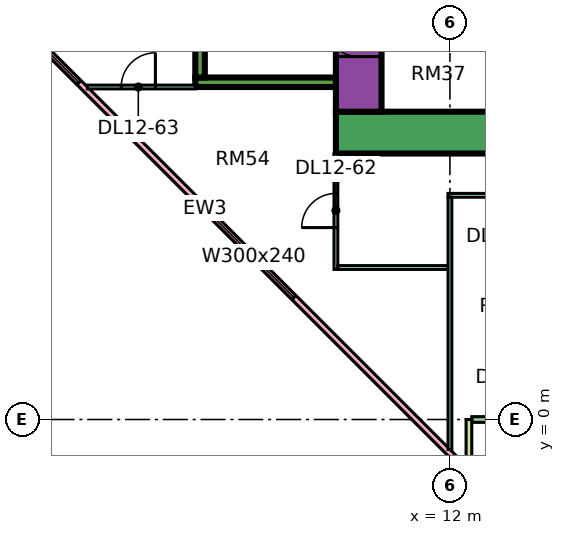
"""IFC4 building model, lengths in metres.
Left out: names, types, materials, properties, quantities, classifications, styles, units other than length and angle.
Written with IfcOpenShell. Run it as: python <this file> out.ifc"""

import sys

from ifc_helpers import new_model, si_unit, direction, frame, frame_2d, origin, place, context, subcontext, project, spatial, rectangle, extrude, element, fill, save


model = new_model("IFC4")
c1 = context("Model", 3, precision=1e-05, world=origin(), true_north=direction((0.0, 1.0)))
c2 = subcontext(c1, "Body", "Model", "MODEL_VIEW")
j1 = project(units=[si_unit("LENGTHUNIT", "METRE"), si_unit("PLANEANGLEUNIT", "RADIAN")], contexts=[c1])
p1 = place(None, origin())
s1 = spatial("IfcSite", under=j1, at=p1, CompositionType="ELEMENT")
p2 = place(p1, origin())
s2 = spatial("IfcBuilding", under=s1, at=p2, CompositionType="ELEMENT")
p3 = place(p2, frame((0.0, 0.0, 60.15)))
s3 = spatial("IfcBuildingStorey", under=s2, at=p3, CompositionType="ELEMENT", Elevation=60.15)
p4 = place(p3, frame((9.0, 7.55, 0.0), z_axis=(0.0, 0.0, 1.0), x_axis=(1.0, 0.0, 0.0)))
e1 = element("IfcWall", 1, at=p4, inside=s3, PredefinedType="SHEAR", context=c2, shape_type="SweptSolid", body=[
    extrude(rectangle(XDim=25.0, YDim=1.1, at=frame_2d((12.5, 0.0))), origin(), (0.0, 0.0, 1.0), 3.75),
])
p5 = place(p3, frame((9.6, 8.1, 0.0), z_axis=(0.0, 0.0, 1.0), x_axis=(0.0, 1.0, 0.0)))
e2 = element("IfcWall", 2, at=p5, inside=s3, PredefinedType="SHEAR", context=c2, shape_type="SweptSolid", body=[
    extrude(rectangle(XDim=10.8, YDim=1.2, at=frame_2d((5.4, 0.0))), origin(), (0.0, 0.0, 1.0), 3.75),
])
p6 = place(p5, frame((3.775, 0.0, 0.0)))
e3 = element("IfcOpeningElement", 3, at=p6, cuts=e2, PredefinedType="OPENING", context=c2, shape_type="SweptSolid", body=[
    extrude(rectangle(XDim=1.1, YDim=2.2, at=frame_2d((0.55, 1.1))), frame((0.0, 0.61, 0.0), z_axis=(0.0, -1.0, 0.0), x_axis=(1.0, 0.0, 0.0)), (0.0, 0.0, 1.0), 1.22),
])
p7 = place(p5, frame((6.275, 0.0, 0.0)))
e4 = element("IfcOpeningElement", 4, at=p7, cuts=e2, PredefinedType="OPENING", context=c2, shape_type="SweptSolid", body=[
    extrude(rectangle(XDim=1.1, YDim=2.2, at=frame_2d((0.55, 1.1))), frame((0.0, 0.61, 0.0), z_axis=(0.0, -1.0, 0.0), x_axis=(1.0, 0.0, 0.0)), (0.0, 0.0, 1.0), 1.22),
])
p8 = place(p5, frame((8.95, 0.0, 0.0)))
e5 = element("IfcOpeningElement", 5, at=p8, cuts=e2, PredefinedType="OPENING", context=c2, shape_type="SweptSolid", body=[
    extrude(rectangle(XDim=1.1, YDim=2.2, at=frame_2d((0.55, 1.1))), frame((0.0, 0.61, 0.0), z_axis=(0.0, -1.0, 0.0), x_axis=(1.0, 0.0, 0.0)), (0.0, 0.0, 1.0), 1.22),
])
p9 = place(p5, frame((1.45, 0.0, 0.0)))
e6 = element("IfcOpeningElement", 6, at=p9, cuts=e2, PredefinedType="OPENING", context=c2, shape_type="SweptSolid", body=[
    extrude(rectangle(XDim=0.9, YDim=2.1, at=frame_2d((0.45, 1.05))), frame((0.0, 0.61, 0.0), z_axis=(0.0, -1.0, 0.0), x_axis=(1.0, 0.0, 0.0)), (0.0, 0.0, 1.0), 1.22),
])
p10 = place(p3, frame((5.3, 8.875, 0.0), z_axis=(0.0, 0.0, 1.0), x_axis=(1.0, 0.0, 0.0)))
e7 = element("IfcWall", 7, at=p10, inside=s3, PredefinedType="SHEAR", context=c2, shape_type="SweptSolid", body=[
    extrude(rectangle(XDim=3.7, YDim=0.25, at=frame_2d((1.85, 0.0))), origin(), (0.0, 0.0, 1.0), 3.75),
])
p11 = place(p3, frame((5.425, 9.0, 0.0), z_axis=(0.0, 0.0, 1.0), x_axis=(0.0, 1.0, 0.0)))
e8 = element("IfcWall", 8, at=p11, inside=s3, PredefinedType="SHEAR", context=c2, shape_type="SweptSolid", body=[
    extrude(rectangle(XDim=4.0, YDim=0.25, at=frame_2d((2.0, 0.0))), origin(), (0.0, 0.0, 1.0), 3.75),
])
p12 = place(p3, frame((-1.447, 12.553, 0.0), z_axis=(0.0, 0.0, 1.0), x_axis=(0.707106781187, -0.707106781187, 0.0)))
e9 = element("IfcWall", 9, at=p12, inside=s3, PredefinedType="SOLIDWALL", context=c2, shape_type="SweptSolid", body=[
    extrude(rectangle(XDim=19.799, YDim=0.15, at=frame_2d((9.899, 0.0))), origin(), (0.0, 0.0, 1.0), 3.35),
])
p13 = place(p12, frame((2.212, 0.0, 0.45)))
e10 = element("IfcOpeningElement", 10, at=p13, cuts=e9, PredefinedType="OPENING", context=c2, shape_type="SweptSolid", body=[
    extrude(rectangle(XDim=3.0, YDim=2.4, at=frame_2d((1.5, 1.2))), frame((0.0, 0.085, 0.0), z_axis=(0.0, -1.0, 0.0), x_axis=(1.0, 0.0, 0.0)), (0.0, 0.0, 1.0), 0.17),
])
p14 = place(p12, frame((10.216, 0.0, 0.45)))
e11 = element("IfcOpeningElement", 11, at=p14, cuts=e9, PredefinedType="OPENING", context=c2, shape_type="SweptSolid", body=[
    extrude(rectangle(XDim=3.0, YDim=2.4, at=frame_2d((1.5, 1.2))), frame((0.0, 0.085, 0.0), z_axis=(0.0, -1.0, 0.0), x_axis=(1.0, 0.0, 0.0)), (0.0, 0.0, 1.0), 0.17),
])
p15 = place(p3, frame((12.575, 0.0, 0.0), z_axis=(0.0, 0.0, 1.0), x_axis=(1.0, 0.0, 0.0)))
e12 = element("IfcWall", 12, at=p15, inside=s3, PredefinedType="SOLIDWALL", context=c2, shape_type="SweptSolid", body=[
    extrude(rectangle(XDim=11.35, YDim=0.15, at=frame_2d((5.675, 0.0))), origin(), (0.0, 0.0, 1.0), 3.35),
])
p16 = place(p15, frame((0.613, 0.0, 0.0)))
e13 = element("IfcOpeningElement", 13, at=p16, cuts=e12, PredefinedType="OPENING", context=c2, shape_type="SweptSolid", body=[
    extrude(rectangle(XDim=1.2, YDim=2.4, at=frame_2d((0.6, 1.2))), frame((0.0, 0.085, 0.0), z_axis=(0.0, -1.0, 0.0), x_axis=(1.0, 0.0, 0.0)), (0.0, 0.0, 1.0), 0.17),
])
p17 = place(p15, frame((3.025, 0.0, 0.45)))
e14 = element("IfcOpeningElement", 14, at=p17, cuts=e12, PredefinedType="OPENING", context=c2, shape_type="SweptSolid", body=[
    extrude(rectangle(XDim=1.8, YDim=2.4, at=frame_2d((0.9, 1.2))), frame((0.0, 0.085, 0.0), z_axis=(0.0, -1.0, 0.0), x_axis=(1.0, 0.0, 0.0)), (0.0, 0.0, 1.0), 0.17),
])
p18 = place(p15, frame((6.025, 0.0, 0.45)))
e15 = element("IfcOpeningElement", 15, at=p18, cuts=e12, PredefinedType="OPENING", context=c2, shape_type="SweptSolid", body=[
    extrude(rectangle(XDim=1.8, YDim=2.4, at=frame_2d((0.9, 1.2))), frame((0.0, 0.085, 0.0), z_axis=(0.0, -1.0, 0.0), x_axis=(1.0, 0.0, 0.0)), (0.0, 0.0, 1.0), 0.17),
])
p19 = place(p15, frame((9.0, 0.0, 0.45)))
e16 = element("IfcOpeningElement", 16, at=p19, cuts=e12, PredefinedType="OPENING", context=c2, shape_type="SweptSolid", body=[
    extrude(rectangle(XDim=1.2, YDim=2.4, at=frame_2d((0.6, 1.2))), frame((0.0, 0.085, 0.0), z_axis=(0.0, -1.0, 0.0), x_axis=(1.0, 0.0, 0.0)), (0.0, 0.0, 1.0), 0.17),
])
p20 = place(p3, frame((12.5, -1.5, 0.0), z_axis=(0.0, 0.0, 1.0), x_axis=(0.0, 1.0, 0.0)))
e17 = element("IfcWall", 17, at=p20, inside=s3, PredefinedType="SOLIDWALL", context=c2, shape_type="SweptSolid", body=[
    extrude(rectangle(XDim=1.5, YDim=0.15, at=frame_2d((0.75, 0.0))), origin(), (0.0, 0.0, 1.0), 3.35),
])
p21 = place(p3, frame((2.461, 8.75, 0.0), z_axis=(0.0, 0.0, 1.0), x_axis=(1.0, 0.0, 0.0)))
e18 = element("IfcWall", 18, at=p21, inside=s3, PredefinedType="PARTITIONING", context=c2, shape_type="SweptSolid", body=[
    extrude(rectangle(XDim=2.839, YDim=0.1, at=frame_2d((1.419, 0.0))), origin(), (0.0, 0.0, 1.0), 3.35),
])
p22 = place(p21, frame((0.889, 0.0, 0.0)))
e19 = element("IfcOpeningElement", 19, at=p22, cuts=e18, PredefinedType="OPENING", context=c2, shape_type="SweptSolid", body=[
    extrude(rectangle(XDim=0.9, YDim=2.1, at=frame_2d((0.45, 1.05))), frame((0.0, 0.06, 0.0), z_axis=(0.0, -1.0, 0.0), x_axis=(1.0, 0.0, 0.0)), (0.0, 0.0, 1.0), 0.12),
])
p23 = place(p3, frame((9.0, 3.95, 0.0), z_axis=(0.0, 0.0, 1.0), x_axis=(0.0, 1.0, 0.0)))
e20 = element("IfcWall", 20, at=p23, inside=s3, PredefinedType="PARTITIONING", context=c2, shape_type="SweptSolid", body=[
    extrude(rectangle(XDim=3.05, YDim=0.1, at=frame_2d((1.525, 0.0))), origin(), (0.0, 0.0, 1.0), 3.35),
])
p24 = place(p23, frame((1.1, 0.0, 0.0)))
e21 = element("IfcOpeningElement", 21, at=p24, cuts=e20, PredefinedType="OPENING", context=c2, shape_type="SweptSolid", body=[
    extrude(rectangle(XDim=0.9, YDim=2.1, at=frame_2d((0.45, 1.05))), frame((0.0, 0.06, 0.0), z_axis=(0.0, -1.0, 0.0), x_axis=(1.0, 0.0, 0.0)), (0.0, 0.0, 1.0), 0.12),
])
p25 = place(p3, frame((9.05, 4.0, 0.0), z_axis=(0.0, 0.0, 1.0), x_axis=(1.0, 0.0, 0.0)))
e22 = element("IfcWall", 22, at=p25, inside=s3, PredefinedType="PARTITIONING", context=c2, shape_type="SweptSolid", body=[
    extrude(rectangle(XDim=2.9, YDim=0.1, at=frame_2d((1.45, 0.0))), origin(), (0.0, 0.0, 1.0), 3.35),
])
p26 = place(p3, frame((11.95, 5.9, 0.0), z_axis=(0.0, 0.0, 1.0), x_axis=(1.0, 0.0, 0.0)))
e23 = element("IfcWall", 23, at=p26, inside=s3, PredefinedType="PARTITIONING", context=c2, shape_type="SweptSolid", body=[
    extrude(rectangle(XDim=21.1, YDim=0.1, at=frame_2d((10.55, 0.0))), origin(), (0.0, 0.0, 1.0), 3.35),
])
p27 = place(p26, frame((1.1, 0.0, 0.0)))
e24 = element("IfcOpeningElement", 24, at=p27, cuts=e23, PredefinedType="OPENING", context=c2, shape_type="SweptSolid", body=[
    extrude(rectangle(XDim=0.9, YDim=2.1, at=frame_2d((0.45, 1.05))), frame((0.0, 0.06, 0.0), z_axis=(0.0, -1.0, 0.0), x_axis=(1.0, 0.0, 0.0)), (0.0, 0.0, 1.0), 0.12),
])
p28 = place(p26, frame((4.1, 0.0, 0.0)))
e25 = element("IfcOpeningElement", 25, at=p28, cuts=e23, PredefinedType="OPENING", context=c2, shape_type="SweptSolid", body=[
    extrude(rectangle(XDim=0.9, YDim=2.1, at=frame_2d((0.45, 1.05))), frame((0.0, 0.06, 0.0), z_axis=(0.0, -1.0, 0.0), x_axis=(1.0, 0.0, 0.0)), (0.0, 0.0, 1.0), 0.12),
])
p29 = place(p26, frame((7.1, 0.0, 0.0)))
e26 = element("IfcOpeningElement", 26, at=p29, cuts=e23, PredefinedType="OPENING", context=c2, shape_type="SweptSolid", body=[
    extrude(rectangle(XDim=0.9, YDim=2.1, at=frame_2d((0.45, 1.05))), frame((0.0, 0.06, 0.0), z_axis=(0.0, -1.0, 0.0), x_axis=(1.0, 0.0, 0.0)), (0.0, 0.0, 1.0), 0.12),
])
p30 = place(p26, frame((10.1, 0.0, 0.0)))
e27 = element("IfcOpeningElement", 27, at=p30, cuts=e23, PredefinedType="OPENING", context=c2, shape_type="SweptSolid", body=[
    extrude(rectangle(XDim=0.9, YDim=2.1, at=frame_2d((0.45, 1.05))), frame((0.0, 0.06, 0.0), z_axis=(0.0, -1.0, 0.0), x_axis=(1.0, 0.0, 0.0)), (0.0, 0.0, 1.0), 0.12),
])
p31 = place(p26, frame((16.1, 0.0, 0.0)))
e28 = element("IfcOpeningElement", 28, at=p31, cuts=e23, PredefinedType="OPENING", context=c2, shape_type="SweptSolid", body=[
    extrude(rectangle(XDim=0.9, YDim=2.1, at=frame_2d((0.45, 1.05))), frame((0.0, 0.06, 0.0), z_axis=(0.0, -1.0, 0.0), x_axis=(1.0, 0.0, 0.0)), (0.0, 0.0, 1.0), 0.12),
])
p32 = place(p3, frame((12.0, -0.788, 0.0), z_axis=(0.0, 0.0, 1.0), x_axis=(0.0, 1.0, 0.0)))
e29 = element("IfcWall", 29, at=p32, inside=s3, PredefinedType="PARTITIONING", context=c2, shape_type="SweptSolid", body=[
    extrude(rectangle(XDim=6.638, YDim=0.1, at=frame_2d((3.319, 0.0))), origin(), (0.0, 0.0, 1.0), 3.35),
])
p33 = place(p13, origin())
e30 = element("IfcWindow", 30, at=p33, inside=s3, PartitioningType="SINGLE_PANEL", PredefinedType="WINDOW", context=c2, shape_type="SweptSolid", body=[
    extrude(rectangle(XDim=3.0, YDim=2.4, at=frame_2d((1.5, 1.2))), frame((0.0, 0.03, 0.0), z_axis=(0.0, -1.0, 0.0), x_axis=(1.0, 0.0, 0.0)), (0.0, 0.0, 1.0), 0.06),
])
fill(e10, e30)
p34 = place(p14, origin())
e31 = element("IfcWindow", 31, at=p34, inside=s3, PartitioningType="SINGLE_PANEL", PredefinedType="WINDOW", context=c2, shape_type="SweptSolid", body=[
    extrude(rectangle(XDim=3.0, YDim=2.4, at=frame_2d((1.5, 1.2))), frame((0.0, 0.03, 0.0), z_axis=(0.0, -1.0, 0.0), x_axis=(1.0, 0.0, 0.0)), (0.0, 0.0, 1.0), 0.06),
])
fill(e11, e31)
p35 = place(p9, frame((0.9, 0.0, 0.0), z_axis=(0.0, 0.0, 1.0), x_axis=(-1.0, 0.0, 0.0)))
e32 = element("IfcDoor", 32, at=p35, inside=s3, OperationType="SINGLE_SWING_RIGHT", PredefinedType="DOOR", context=c2, shape_type="SweptSolid", body=[
    extrude(rectangle(XDim=0.9, YDim=2.1, at=frame_2d((0.45, 1.05))), frame((0.0, 0.025, 0.0), z_axis=(0.0, -1.0, 0.0), x_axis=(1.0, 0.0, 0.0)), (0.0, 0.0, 1.0), 0.05),
])
fill(e6, e32)
p36 = place(p24, origin())
e33 = element("IfcDoor", 33, at=p36, inside=s3, OperationType="SINGLE_SWING_LEFT", PredefinedType="DOOR", context=c2, shape_type="SweptSolid", body=[
    extrude(rectangle(XDim=0.9, YDim=2.1, at=frame_2d((0.45, 1.05))), frame((0.0, 0.025, 0.0), z_axis=(0.0, -1.0, 0.0), x_axis=(1.0, 0.0, 0.0)), (0.0, 0.0, 1.0), 0.05),
])
fill(e21, e33)
p37 = place(p22, frame((0.9, 0.0, 0.0), z_axis=(0.0, 0.0, 1.0), x_axis=(-1.0, 0.0, 0.0)))
e34 = element("IfcDoor", 34, at=p37, inside=s3, OperationType="SINGLE_SWING_RIGHT", PredefinedType="DOOR", context=c2, shape_type="SweptSolid", body=[
    extrude(rectangle(XDim=0.9, YDim=2.1, at=frame_2d((0.45, 1.05))), frame((0.0, 0.025, 0.0), z_axis=(0.0, -1.0, 0.0), x_axis=(1.0, 0.0, 0.0)), (0.0, 0.0, 1.0), 0.05),
])
fill(e19, e34)
save(model, sys.argv[1])
